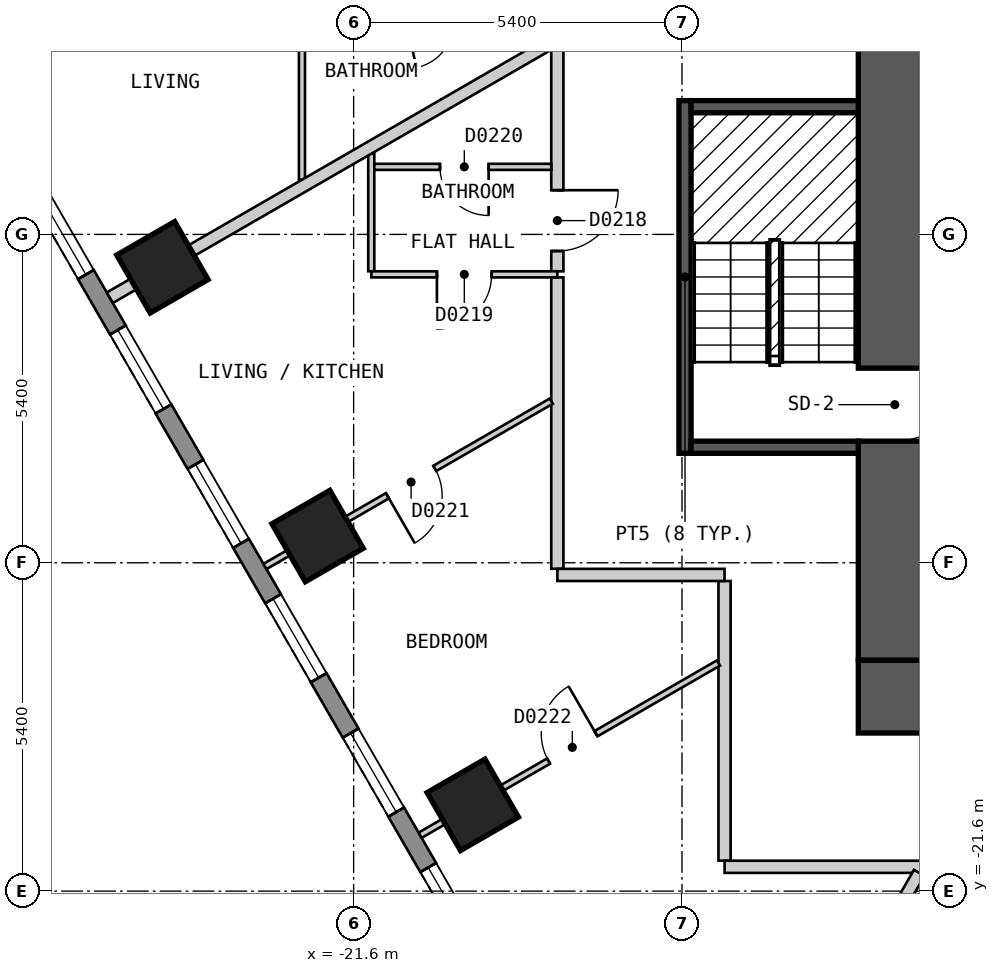
"""IFC4 building model, lengths in metres.
Left out: names, types, materials, properties, quantities, classifications, styles, units other than length and angle.
Written with IfcOpenShell. Run it as: python <this file> out.ifc"""

import sys

from ifc_helpers import new_model, si_unit, direction, frame, frame_2d, origin, origin_2d, place, context, subcontext, project, spatial, polyline, rectangle, outline, extrude, element, fill, save


model = new_model("IFC4")
c1 = context("Model", 3, precision=1e-05, world=origin(), true_north=direction((0.0, 1.0)))
c2 = subcontext(c1, "Body", "Model", "MODEL_VIEW")
j1 = project(units=[si_unit("LENGTHUNIT", "METRE"), si_unit("PLANEANGLEUNIT", "RADIAN")], contexts=[c1])
p1 = place(None, origin())
s1 = spatial("IfcSite", under=j1, at=p1, CompositionType="ELEMENT")
p2 = place(p1, origin())
s2 = spatial("IfcBuilding", under=s1, at=p2, CompositionType="ELEMENT")
p3 = place(p2, frame((0.0, 0.0, 47.4)))
s3 = spatial("IfcBuildingStorey", under=s2, at=p3, CompositionType="ELEMENT", Elevation=47.4)
for number, where, z_axis, x_axis in (
    (1, (-24.745, -11.341, 0.0), (0.0, 0.0, 1.0), (0.5, -0.866, 0.0)),
    (2, (-22.193, -15.761, 0.0), (0.0, 0.0, 1.0), (0.5, -0.866, 0.0)),
    (3, (-19.641, -20.181, 0.0), (0.0, 0.0, 1.0), (0.5, -0.866, 0.0)),
):
    element("IfcColumn", number, at=place(p3, frame(where, z_axis=z_axis, x_axis=x_axis)), inside=s3, PredefinedType="COLUMN", context=c2, shape_type="SweptSolid", body=[
        extrude(rectangle(XDim=1.1, YDim=1.1, at=origin_2d()), origin(), (0.0, 0.0, 1.0), 3.0),
    ])
p4 = place(p3, frame((-13.3, -18.4, 0.0), z_axis=(0.0, 0.0, 1.0), x_axis=(1.0, 0.0, 0.0)))
e4 = element("IfcWall", 4, at=p4, inside=s3, PredefinedType="SHEAR", context=c2, shape_type="SweptSolid", body=[
    extrude(rectangle(XDim=26.6, YDim=1.2, at=frame_2d((13.3, 0.0))), origin(), (0.0, 0.0, 1.0), 2.7),
])
p5 = place(p3, frame((-12.7, -17.8, 0.0), z_axis=(0.0, 0.0, 1.0), x_axis=(0.0, 1.0, 0.0)))
e5 = element("IfcWall", 5, at=p5, inside=s3, PredefinedType="SHEAR", context=c2, shape_type="SweptSolid", body=[
    extrude(rectangle(XDim=11.6, YDim=1.2, at=frame_2d((5.8, 0.0))), origin(), (0.0, 0.0, 1.0), 2.7),
])
p6 = place(p5, frame((3.6, 0.0, 0.0)))
e6 = element("IfcOpeningElement", 6, at=p6, cuts=e5, PredefinedType="OPENING", context=c2, shape_type="SweptSolid", body=[
    extrude(rectangle(XDim=1.2, YDim=2.1, at=frame_2d((0.6, 1.05))), frame((0.0, 0.61, 0.0), z_axis=(0.0, -1.0, 0.0), x_axis=(1.0, 0.0, 0.0)), (0.0, 0.0, 1.0), 1.22),
])
p7 = place(p3, frame((-31.22, -2.425, 0.0), z_axis=(0.0, 0.0, 1.0), x_axis=(0.500001938803, -0.866024284413, 0.0)))
e7 = element("IfcWall", 7, at=p7, inside=s3, PredefinedType="SOLIDWALL", context=c2, shape_type="SweptSolid", body=[
    extrude(outline(polyline([(0.0, -0.15), (27.02, -0.15), (26.94, 0.15), (0.08, 0.15), (0.0, -0.15)])), origin(), (0.0, 0.0, 1.0), 2.7),
])
p8 = place(p7, frame((1.277, 0.0, 0.15)))
e8 = element("IfcOpeningElement", 8, at=p8, cuts=e7, PredefinedType="OPENING", context=c2, shape_type="SweptSolid", body=[
    extrude(rectangle(XDim=1.5, YDim=2.1, at=frame_2d((0.75, 1.05))), frame((0.0, 0.16, 0.0), z_axis=(0.0, -1.0, 0.0), x_axis=(1.0, 0.0, 0.0)), (0.0, 0.0, 1.0), 0.32),
])
p9 = place(p7, frame((3.829, 0.0, 0.15)))
e9 = element("IfcOpeningElement", 9, at=p9, cuts=e7, PredefinedType="OPENING", context=c2, shape_type="SweptSolid", body=[
    extrude(rectangle(XDim=1.5, YDim=2.1, at=frame_2d((0.75, 1.05))), frame((0.0, 0.16, 0.0), z_axis=(0.0, -1.0, 0.0), x_axis=(1.0, 0.0, 0.0)), (0.0, 0.0, 1.0), 0.32),
])
p10 = place(p7, frame((6.382, 0.0, 0.15)))
e10 = element("IfcOpeningElement", 10, at=p10, cuts=e7, PredefinedType="OPENING", context=c2, shape_type="SweptSolid", body=[
    extrude(rectangle(XDim=1.5, YDim=2.1, at=frame_2d((0.75, 1.05))), frame((0.0, 0.16, 0.0), z_axis=(0.0, -1.0, 0.0), x_axis=(1.0, 0.0, 0.0)), (0.0, 0.0, 1.0), 0.32),
])
p11 = place(p7, frame((8.933, 0.0, 0.15)))
e11 = element("IfcOpeningElement", 11, at=p11, cuts=e7, PredefinedType="OPENING", context=c2, shape_type="SweptSolid", body=[
    extrude(rectangle(XDim=1.5, YDim=2.1, at=frame_2d((0.75, 1.05))), frame((0.0, 0.16, 0.0), z_axis=(0.0, -1.0, 0.0), x_axis=(1.0, 0.0, 0.0)), (0.0, 0.0, 1.0), 0.32),
])
p12 = place(p7, frame((11.485, 0.0, 0.15)))
e12 = element("IfcOpeningElement", 12, at=p12, cuts=e7, PredefinedType="OPENING", context=c2, shape_type="SweptSolid", body=[
    extrude(rectangle(XDim=1.5, YDim=2.1, at=frame_2d((0.75, 1.05))), frame((0.0, 0.16, 0.0), z_axis=(0.0, -1.0, 0.0), x_axis=(1.0, 0.0, 0.0)), (0.0, 0.0, 1.0), 0.32),
])
p13 = place(p7, frame((14.037, 0.0, 0.15)))
e13 = element("IfcOpeningElement", 13, at=p13, cuts=e7, PredefinedType="OPENING", context=c2, shape_type="SweptSolid", body=[
    extrude(rectangle(XDim=1.5, YDim=2.1, at=frame_2d((0.75, 1.05))), frame((0.0, 0.16, 0.0), z_axis=(0.0, -1.0, 0.0), x_axis=(1.0, 0.0, 0.0)), (0.0, 0.0, 1.0), 0.32),
])
p14 = place(p7, frame((16.589, 0.0, 0.15)))
e14 = element("IfcOpeningElement", 14, at=p14, cuts=e7, PredefinedType="OPENING", context=c2, shape_type="SweptSolid", body=[
    extrude(rectangle(XDim=1.5, YDim=2.1, at=frame_2d((0.75, 1.05))), frame((0.0, 0.16, 0.0), z_axis=(0.0, -1.0, 0.0), x_axis=(1.0, 0.0, 0.0)), (0.0, 0.0, 1.0), 0.32),
])
p15 = place(p7, frame((19.141, 0.0, 0.15)))
e15 = element("IfcOpeningElement", 15, at=p15, cuts=e7, PredefinedType="OPENING", context=c2, shape_type="SweptSolid", body=[
    extrude(rectangle(XDim=1.5, YDim=2.1, at=frame_2d((0.75, 1.05))), frame((0.0, 0.16, 0.0), z_axis=(0.0, -1.0, 0.0), x_axis=(1.0, 0.0, 0.0)), (0.0, 0.0, 1.0), 0.32),
])
p16 = place(p7, frame((21.693, 0.0, 0.15)))
e16 = element("IfcOpeningElement", 16, at=p16, cuts=e7, PredefinedType="OPENING", context=c2, shape_type="SweptSolid", body=[
    extrude(rectangle(XDim=1.5, YDim=2.1, at=frame_2d((0.75, 1.05))), frame((0.0, 0.16, 0.0), z_axis=(0.0, -1.0, 0.0), x_axis=(1.0, 0.0, 0.0)), (0.0, 0.0, 1.0), 0.32),
])
p17 = place(p7, frame((24.244, 0.0, 0.15)))
e17 = element("IfcOpeningElement", 17, at=p17, cuts=e7, PredefinedType="OPENING", context=c2, shape_type="SweptSolid", body=[
    extrude(rectangle(XDim=1.5, YDim=2.1, at=frame_2d((0.75, 1.05))), frame((0.0, 0.16, 0.0), z_axis=(0.0, -1.0, 0.0), x_axis=(1.0, 0.0, 0.0)), (0.0, 0.0, 1.0), 0.32),
])
p18 = place(p3, frame((-15.5, -16.5, 0.0), z_axis=(0.0, 0.0, 1.0), x_axis=(0.0, -1.0, 0.0)))
e18 = element("IfcWall", 18, at=p18, inside=s3, PredefinedType="PARTITIONING", context=c2, shape_type="SweptSolid", body=[
    extrude(rectangle(XDim=4.599, YDim=0.2, at=frame_2d((2.3, 0.0))), origin(), (0.0, 0.0, 1.0), 2.7),
])
p19 = place(p3, frame((-18.25, -11.507, 0.0), z_axis=(0.0, 0.0, 1.0), x_axis=(0.0, -1.0, 0.0)))
e19 = element("IfcWall", 19, at=p19, inside=s3, PredefinedType="PARTITIONING", context=c2, shape_type="SweptSolid", body=[
    extrude(rectangle(XDim=4.792, YDim=0.2, at=frame_2d((2.396, 0.0))), origin(), (0.0, 0.0, 1.0), 2.7),
])
p20 = place(p3, frame((-18.249, -16.4, 0.0), z_axis=(0.0, 0.0, 1.0), x_axis=(1.0, 0.0, 0.0)))
e20 = element("IfcWall", 20, at=p20, inside=s3, PredefinedType="PARTITIONING", context=c2, shape_type="SweptSolid", body=[
    extrude(rectangle(XDim=2.749, YDim=0.2, at=frame_2d((1.375, 0.0))), origin(), (0.0, 0.0, 1.0), 2.7),
])
p21 = place(p3, frame((-15.499, -21.2, 0.0), z_axis=(0.0, 0.0, 1.0), x_axis=(1.0, 0.0, 0.0)))
e21 = element("IfcWall", 21, at=p21, inside=s3, PredefinedType="PARTITIONING", context=c2, shape_type="SweptSolid", body=[
    extrude(rectangle(XDim=30.898, YDim=0.2, at=frame_2d((15.449, 0.0))), origin(), (0.0, 0.0, 1.0), 2.7),
])
p22 = place(p21, frame((5.084, 0.0, 0.0)))
e22 = element("IfcOpeningElement", 22, at=p22, cuts=e21, PredefinedType="OPENING", context=c2, shape_type="SweptSolid", body=[
    extrude(rectangle(XDim=0.9, YDim=2.1, at=frame_2d((0.45, 1.05))), frame((0.0, 0.11, 0.0), z_axis=(0.0, -1.0, 0.0), x_axis=(1.0, 0.0, 0.0)), (0.0, 0.0, 1.0), 0.22),
])
p23 = place(p21, frame((15.0, 0.0, 0.0)))
e23 = element("IfcOpeningElement", 23, at=p23, cuts=e21, PredefinedType="OPENING", context=c2, shape_type="SweptSolid", body=[
    extrude(rectangle(XDim=1.0, YDim=2.1, at=frame_2d((0.5, 1.05))), frame((0.0, 0.11, 0.0), z_axis=(0.0, -1.0, 0.0), x_axis=(1.0, 0.0, 0.0)), (0.0, 0.0, 1.0), 0.22),
])
p24 = place(p21, frame((25.015, 0.0, 0.0)))
e24 = element("IfcOpeningElement", 24, at=p24, cuts=e21, PredefinedType="OPENING", context=c2, shape_type="SweptSolid", body=[
    extrude(rectangle(XDim=0.9, YDim=2.1, at=frame_2d((0.45, 1.05))), frame((0.0, 0.11, 0.0), z_axis=(0.0, -1.0, 0.0), x_axis=(1.0, 0.0, 0.0)), (0.0, 0.0, 1.0), 0.22),
])
p25 = place(p3, frame((-18.25, -11.407, 0.0), z_axis=(0.0, 0.0, 1.0), x_axis=(0.0, 1.0, 0.0)))
e25 = element("IfcWall", 25, at=p25, inside=s3, PredefinedType="PARTITIONING", context=c2, shape_type="SweptSolid", body=[
    extrude(rectangle(XDim=3.665, YDim=0.2, at=frame_2d((1.833, 0.0))), origin(), (0.0, 0.0, 1.0), 2.7),
])
p26 = place(p25, frame((0.334, 0.0, 0.0)))
e26 = element("IfcOpeningElement", 26, at=p26, cuts=e25, PredefinedType="OPENING", context=c2, shape_type="SweptSolid", body=[
    extrude(rectangle(XDim=1.0, YDim=2.1, at=frame_2d((0.5, 1.05))), frame((0.0, 0.11, 0.0), z_axis=(0.0, -1.0, 0.0), x_axis=(1.0, 0.0, 0.0)), (0.0, 0.0, 1.0), 0.22),
])
p27 = place(p3, frame((-21.31, -9.474, 0.0), z_axis=(0.0, 0.0, 1.0), x_axis=(0.0, -1.0, 0.0)))
e27 = element("IfcWall", 27, at=p27, inside=s3, PredefinedType="PARTITIONING", context=c2, shape_type="SweptSolid", body=[
    extrude(rectangle(XDim=1.932, YDim=0.1, at=frame_2d((0.966, 0.0))), origin(), (0.0, 0.0, 1.0), 2.7),
])
p28 = place(p3, frame((-21.26, -9.689, 0.0), z_axis=(0.0, 0.0, 1.0), x_axis=(1.0, 0.0, 0.0)))
e28 = element("IfcWall", 28, at=p28, inside=s3, PredefinedType="PARTITIONING", context=c2, shape_type="SweptSolid", body=[
    extrude(rectangle(XDim=2.91, YDim=0.1, at=frame_2d((1.455, 0.0))), origin(), (0.0, 0.0, 1.0), 2.7),
])
p29 = place(p28, frame((1.08, 0.0, 0.0)))
e29 = element("IfcOpeningElement", 29, at=p29, cuts=e28, PredefinedType="OPENING", context=c2, shape_type="SweptSolid", body=[
    extrude(rectangle(XDim=0.8, YDim=2.1, at=frame_2d((0.4, 1.05))), frame((0.0, 0.06, 0.0), z_axis=(0.0, -1.0, 0.0), x_axis=(1.0, 0.0, 0.0)), (0.0, 0.0, 1.0), 0.12),
])
p30 = place(p3, frame((-21.309, -11.457, 0.0), z_axis=(0.0, 0.0, 1.0), x_axis=(1.0, 0.0, 0.0)))
e30 = element("IfcWall", 30, at=p30, inside=s3, PredefinedType="PARTITIONING", context=c2, shape_type="SweptSolid", body=[
    extrude(rectangle(XDim=3.059, YDim=0.1, at=frame_2d((1.53, 0.0))), origin(), (0.0, 0.0, 1.0), 2.7),
])
p31 = place(p30, frame((1.079, 0.0, 0.0)))
e31 = element("IfcOpeningElement", 31, at=p31, cuts=e30, PredefinedType="OPENING", context=c2, shape_type="SweptSolid", body=[
    extrude(rectangle(XDim=0.9, YDim=2.1, at=frame_2d((0.45, 1.05))), frame((0.0, 0.06, 0.0), z_axis=(0.0, -1.0, 0.0), x_axis=(1.0, 0.0, 0.0)), (0.0, 0.0, 1.0), 0.12),
])
p32 = place(p3, frame((-22.45, -9.901, 0.0), z_axis=(0.0, 0.0, 1.0), x_axis=(0.0, 1.0, 0.0)))
e32 = element("IfcWall", 32, at=p32, inside=s3, PredefinedType="PARTITIONING", context=c2, shape_type="SweptSolid", body=[
    extrude(rectangle(XDim=4.385, YDim=0.1, at=frame_2d((2.192, 0.0))), origin(), (0.0, 0.0, 1.0), 2.7),
])
p33 = place(p32, frame((2.855, 0.0, 0.0)))
e33 = element("IfcOpeningElement", 33, at=p33, cuts=e32, PredefinedType="OPENING", context=c2, shape_type="SweptSolid", body=[
    extrude(rectangle(XDim=0.9, YDim=2.1, at=frame_2d((0.45, 1.05))), frame((0.0, 0.06, 0.0), z_axis=(0.0, -1.0, 0.0), x_axis=(1.0, 0.0, 0.0)), (0.0, 0.0, 1.0), 0.12),
])
p34 = place(p3, frame((-20.507, -20.681, 0.0), z_axis=(0.0, 0.0, 1.0), x_axis=(0.866028446103, 0.499994730513, 0.0)))
e34 = element("IfcWall", 34, at=p34, inside=s3, PredefinedType="PARTITIONING", context=c2, shape_type="SweptSolid", body=[
    extrude(rectangle(XDim=5.666, YDim=0.1, at=frame_2d((2.833, 0.0))), origin(), (0.0, 0.0, 1.0), 2.7),
])
p35 = place(p34, frame((2.44, 0.0, 0.0)))
e35 = element("IfcOpeningElement", 35, at=p35, cuts=e34, PredefinedType="OPENING", context=c2, shape_type="SweptSolid", body=[
    extrude(rectangle(XDim=0.9, YDim=2.1, at=frame_2d((0.45, 1.05))), frame((0.0, 0.06, 0.0), z_axis=(0.0, -1.0, 0.0), x_axis=(1.0, 0.0, 0.0)), (0.0, 0.0, 1.0), 0.12),
])
p36 = place(p3, frame((-23.059, -16.261, 0.0), z_axis=(0.0, 0.0, 1.0), x_axis=(0.866004639177, 0.500035963631, 0.0)))
e36 = element("IfcWall", 36, at=p36, inside=s3, PredefinedType="PARTITIONING", context=c2, shape_type="SweptSolid", body=[
    extrude(rectangle(XDim=5.438, YDim=0.1, at=frame_2d((2.719, 0.0))), origin(), (0.0, 0.0, 1.0), 2.7),
])
p37 = place(p36, frame((2.326, 0.0, 0.0)))
e37 = element("IfcOpeningElement", 37, at=p37, cuts=e36, PredefinedType="OPENING", context=c2, shape_type="SweptSolid", body=[
    extrude(rectangle(XDim=0.9, YDim=2.1, at=frame_2d((0.45, 1.05))), frame((0.0, 0.06, 0.0), z_axis=(0.0, -1.0, 0.0), x_axis=(1.0, 0.0, 0.0)), (0.0, 0.0, 1.0), 0.12),
])
p38 = place(p3, frame((-12.661, -21.929, 0.0), z_axis=(0.0, 0.0, 1.0), x_axis=(0.499683639304, 0.866207977689, 0.0)))
e38 = element("IfcWall", 38, at=p38, inside=s3, PredefinedType="PARTITIONING", context=c2, shape_type="SweptSolid", body=[
    extrude(rectangle(XDim=0.726, YDim=0.2, at=frame_2d((0.363, 0.0))), origin(), (0.0, 0.0, 1.0), 2.7),
])
p39 = place(p3, frame((-25.61, -11.841, 0.0), z_axis=(0.0, 0.0, 1.0), x_axis=(0.866019023803, 0.500011050288, 0.0)))
e39 = element("IfcWall", 39, at=p39, inside=s3, PredefinedType="PARTITIONING", context=c2, shape_type="SweptSolid", body=[
    extrude(rectangle(XDim=8.47, YDim=0.2, at=frame_2d((4.235, 0.0))), origin(), (0.0, 0.0, 1.0), 2.7),
])
p40 = place(p3, frame((-16.15, -14.4, 0.0), z_axis=(0.0, 0.0, 1.0), x_axis=(0.0, 1.0, 0.0)))
e40 = element("IfcWall", 40, at=p40, inside=s3, PredefinedType="SOLIDWALL", context=c2, shape_type="SweptSolid", body=[
    extrude(rectangle(XDim=5.8, YDim=0.2, at=frame_2d((2.9, 0.0))), origin(), (0.0, 0.0, 1.0), 2.7),
])
for number, where, z_axis, x_axis in (
    (41, (-16.05, -14.3, 0.0), (0.0, 0.0, 1.0), (1.0, 0.0, 0.0)),
    (42, (-16.05, -8.7, 0.0), (0.0, 0.0, 1.0), (1.0, 0.0, 0.0)),
):
    element("IfcWall", number, at=place(p3, frame(where, z_axis=z_axis, x_axis=x_axis)), inside=s3, PredefinedType="SOLIDWALL", context=c2, shape_type="SweptSolid", body=[
        extrude(rectangle(XDim=2.75, YDim=0.2, at=frame_2d((1.375, 0.0))), origin(), (0.0, 0.0, 1.0), 2.7),
    ])
p41 = place(p11, origin())
e43 = element("IfcWindow", 43, at=p41, inside=s3, PartitioningType="SINGLE_PANEL", PredefinedType="WINDOW", context=c2, shape_type="SweptSolid", body=[
    extrude(rectangle(XDim=1.5, YDim=2.1, at=frame_2d((0.75, 1.05))), frame((0.0, 0.03, 0.0), z_axis=(0.0, -1.0, 0.0), x_axis=(1.0, 0.0, 0.0)), (0.0, 0.0, 1.0), 0.06),
])
fill(e11, e43)
p42 = place(p12, origin())
e44 = element("IfcWindow", 44, at=p42, inside=s3, PartitioningType="SINGLE_PANEL", PredefinedType="WINDOW", context=c2, shape_type="SweptSolid", body=[
    extrude(rectangle(XDim=1.5, YDim=2.1, at=frame_2d((0.75, 1.05))), frame((0.0, 0.03, 0.0), z_axis=(0.0, -1.0, 0.0), x_axis=(1.0, 0.0, 0.0)), (0.0, 0.0, 1.0), 0.06),
])
fill(e12, e44)
p43 = place(p13, origin())
e45 = element("IfcWindow", 45, at=p43, inside=s3, PartitioningType="SINGLE_PANEL", PredefinedType="WINDOW", context=c2, shape_type="SweptSolid", body=[
    extrude(rectangle(XDim=1.5, YDim=2.1, at=frame_2d((0.75, 1.05))), frame((0.0, 0.03, 0.0), z_axis=(0.0, -1.0, 0.0), x_axis=(1.0, 0.0, 0.0)), (0.0, 0.0, 1.0), 0.06),
])
fill(e13, e45)
p44 = place(p14, origin())
e46 = element("IfcWindow", 46, at=p44, inside=s3, PartitioningType="SINGLE_PANEL", PredefinedType="WINDOW", context=c2, shape_type="SweptSolid", body=[
    extrude(rectangle(XDim=1.5, YDim=2.1, at=frame_2d((0.75, 1.05))), frame((0.0, 0.03, 0.0), z_axis=(0.0, -1.0, 0.0), x_axis=(1.0, 0.0, 0.0)), (0.0, 0.0, 1.0), 0.06),
])
fill(e14, e46)
p45 = place(p15, origin())
e47 = element("IfcWindow", 47, at=p45, inside=s3, PartitioningType="SINGLE_PANEL", PredefinedType="WINDOW", context=c2, shape_type="SweptSolid", body=[
    extrude(rectangle(XDim=1.5, YDim=2.1, at=frame_2d((0.75, 1.05))), frame((0.0, 0.03, 0.0), z_axis=(0.0, -1.0, 0.0), x_axis=(1.0, 0.0, 0.0)), (0.0, 0.0, 1.0), 0.06),
])
fill(e15, e47)
p46 = place(p16, origin())
e48 = element("IfcWindow", 48, at=p46, inside=s3, PartitioningType="SINGLE_PANEL", PredefinedType="WINDOW", context=c2, shape_type="SweptSolid", body=[
    extrude(rectangle(XDim=1.5, YDim=2.1, at=frame_2d((0.75, 1.05))), frame((0.0, 0.03, 0.0), z_axis=(0.0, -1.0, 0.0), x_axis=(1.0, 0.0, 0.0)), (0.0, 0.0, 1.0), 0.06),
])
fill(e16, e48)
p47 = place(p26, origin())
e49 = element("IfcDoor", 49, at=p47, inside=s3, OperationType="SINGLE_SWING_RIGHT", PredefinedType="DOOR", context=c2, shape_type="SweptSolid", body=[
    extrude(rectangle(XDim=1.0, YDim=2.1, at=frame_2d((0.5, 1.05))), frame((0.0, 0.025, 0.0), z_axis=(0.0, -1.0, 0.0), x_axis=(1.0, 0.0, 0.0)), (0.0, 0.0, 1.0), 0.05),
])
fill(e26, e49)
p48 = place(p31, origin())
e50 = element("IfcDoor", 50, at=p48, inside=s3, OperationType="SINGLE_SWING_LEFT", PredefinedType="DOOR", context=c2, shape_type="SweptSolid", body=[
    extrude(rectangle(XDim=0.9, YDim=2.1, at=frame_2d((0.45, 1.05))), frame((0.0, 0.025, 0.0), z_axis=(0.0, -1.0, 0.0), x_axis=(1.0, 0.0, 0.0)), (0.0, 0.0, 1.0), 0.05),
])
fill(e31, e50)
p49 = place(p29, origin())
e51 = element("IfcDoor", 51, at=p49, inside=s3, OperationType="SINGLE_SWING_RIGHT", PredefinedType="DOOR", context=c2, shape_type="SweptSolid", body=[
    extrude(rectangle(XDim=0.8, YDim=2.1, at=frame_2d((0.4, 1.05))), frame((0.0, 0.025, 0.0), z_axis=(0.0, -1.0, 0.0), x_axis=(1.0, 0.0, 0.0)), (0.0, 0.0, 1.0), 0.05),
])
fill(e29, e51)
p50 = place(p37, origin())
e52 = element("IfcDoor", 52, at=p50, inside=s3, OperationType="SINGLE_SWING_LEFT", PredefinedType="DOOR", context=c2, shape_type="SweptSolid", body=[
    extrude(rectangle(XDim=0.9, YDim=2.1, at=frame_2d((0.45, 1.05))), frame((0.0, 0.025, 0.0), z_axis=(0.0, -1.0, 0.0), x_axis=(1.0, 0.0, 0.0)), (0.0, 0.0, 1.0), 0.05),
])
fill(e37, e52)
p51 = place(p35, origin())
e53 = element("IfcDoor", 53, at=p51, inside=s3, OperationType="SINGLE_SWING_RIGHT", PredefinedType="DOOR", context=c2, shape_type="SweptSolid", body=[
    extrude(rectangle(XDim=0.9, YDim=2.1, at=frame_2d((0.45, 1.05))), frame((0.0, 0.025, 0.0), z_axis=(0.0, -1.0, 0.0), x_axis=(1.0, 0.0, 0.0)), (0.0, 0.0, 1.0), 0.05),
])
fill(e35, e53)
p52 = place(p6, origin())
e54 = element("IfcDoor", 54, at=p52, inside=s3, OperationType="SINGLE_SWING_RIGHT", PredefinedType="DOOR", context=c2, shape_type="SweptSolid", body=[
    extrude(rectangle(XDim=1.2, YDim=2.1, at=frame_2d((0.6, 1.05))), frame((0.0, 0.025, 0.0), z_axis=(0.0, -1.0, 0.0), x_axis=(1.0, 0.0, 0.0)), (0.0, 0.0, 1.0), 0.05),
])
fill(e6, e54)
save(model, sys.argv[1])
